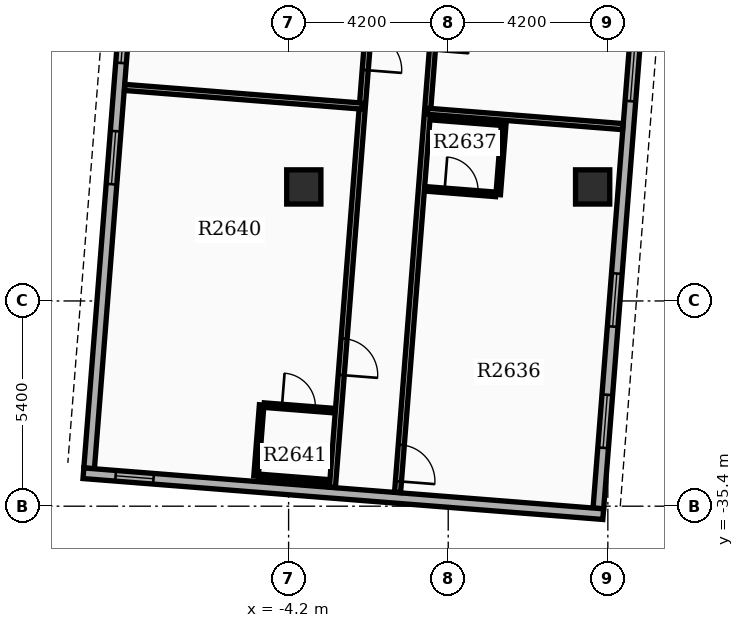
"""IFC4 building model, lengths in metres.
Left out: names, types, materials, properties, quantities, classifications, styles, units other than length and angle.
Written with IfcOpenShell. Run it as: python <this file> out.ifc"""

import sys

from ifc_helpers import new_model, si_unit, direction, frame, frame_2d, origin, origin_2d, place, context, subcontext, project, spatial, rectangle, extrude, element, fill, save


model = new_model("IFC4")
c1 = context("Model", 3, precision=1e-05, world=origin(), true_north=direction((0.0, 1.0)))
c2 = subcontext(c1, "Body", "Model", "MODEL_VIEW")
j1 = project(units=[si_unit("LENGTHUNIT", "METRE"), si_unit("PLANEANGLEUNIT", "RADIAN")], contexts=[c1])
p1 = place(None, origin())
s1 = spatial("IfcSite", under=j1, at=p1, CompositionType="ELEMENT")
p2 = place(p1, origin())
s2 = spatial("IfcBuilding", under=s1, at=p2, CompositionType="ELEMENT")
p3 = place(p2, frame((0.0, 0.0, 164.4)))
s3 = spatial("IfcBuildingStorey", under=s2, at=p3, CompositionType="ELEMENT", Elevation=164.4)
for number, where, z_axis, x_axis in (
    (1, (-3.8, -27.0, 0.0), (0.0, 0.0, 1.0), (1.0, 0.0, 0.0)),
    (2, (3.8, -27.0, 0.0), (0.0, 0.0, 1.0), (1.0, 0.0, 0.0)),
):
    element("IfcColumn", number, at=place(p3, frame(where, z_axis=z_axis, x_axis=x_axis)), inside=s3, PredefinedType="COLUMN", context=c2, shape_type="SweptSolid", body=[
        extrude(rectangle(XDim=0.9, YDim=0.9, at=origin_2d()), origin(), (0.0, 0.0, 1.0), 3.9),
    ])
p4 = place(p3, frame((-7.872, -14.367, 0.0), z_axis=(0.0, 0.0, 1.0), x_axis=(-0.078452802979, -0.996917828963, 0.0)))
e3 = element("IfcWall", 3, at=p4, inside=s3, PredefinedType="STANDARD", context=c2, shape_type="SweptSolid", body=[
    extrude(rectangle(XDim=20.1, YDim=0.28, at=frame_2d((10.05, 0.0))), origin(), (0.0, 0.0, 1.0), 2.97),
])
p5 = place(p4, frame((1.6, 0.0, 0.8)))
e4 = element("IfcOpeningElement", 4, at=p5, cuts=e3, PredefinedType="OPENING", context=c2, shape_type="SweptSolid", body=[
    extrude(rectangle(XDim=1.4, YDim=1.6, at=frame_2d((0.7, 0.8))), frame((0.0, 0.15, 0.0), z_axis=(0.0, -1.0, 0.0), x_axis=(1.0, 0.0, 0.0)), (0.0, 0.0, 1.0), 0.3),
])
p6 = place(p4, frame((4.8, 0.0, 0.8)))
e5 = element("IfcOpeningElement", 5, at=p6, cuts=e3, PredefinedType="OPENING", context=c2, shape_type="SweptSolid", body=[
    extrude(rectangle(XDim=1.4, YDim=1.6, at=frame_2d((0.7, 0.8))), frame((0.0, 0.15, 0.0), z_axis=(0.0, -1.0, 0.0), x_axis=(1.0, 0.0, 0.0)), (0.0, 0.0, 1.0), 0.3),
])
p7 = place(p4, frame((8.0, 0.0, 0.8)))
e6 = element("IfcOpeningElement", 6, at=p7, cuts=e3, PredefinedType="OPENING", context=c2, shape_type="SweptSolid", body=[
    extrude(rectangle(XDim=1.4, YDim=1.6, at=frame_2d((0.7, 0.8))), frame((0.0, 0.15, 0.0), z_axis=(0.0, -1.0, 0.0), x_axis=(1.0, 0.0, 0.0)), (0.0, 0.0, 1.0), 0.3),
])
p8 = place(p4, frame((11.2, 0.0, 0.8)))
e7 = element("IfcOpeningElement", 7, at=p8, cuts=e3, PredefinedType="OPENING", context=c2, shape_type="SweptSolid", body=[
    extrude(rectangle(XDim=1.4, YDim=1.6, at=frame_2d((0.7, 0.8))), frame((0.0, 0.15, 0.0), z_axis=(0.0, -1.0, 0.0), x_axis=(1.0, 0.0, 0.0)), (0.0, 0.0, 1.0), 0.3),
])
p9 = place(p3, frame((3.95, -35.459, 0.0), z_axis=(0.0, 0.0, 1.0), x_axis=(0.078452802979, 0.996917828963, 0.0)))
e8 = element("IfcWall", 8, at=p9, inside=s3, PredefinedType="STANDARD", context=c2, shape_type="SweptSolid", body=[
    extrude(rectangle(XDim=20.1, YDim=0.28, at=frame_2d((10.05, 0.0))), origin(), (0.0, 0.0, 1.0), 2.97),
])
p10 = place(p9, frame((1.6, 0.0, 0.8)))
e9 = element("IfcOpeningElement", 9, at=p10, cuts=e8, PredefinedType="OPENING", context=c2, shape_type="SweptSolid", body=[
    extrude(rectangle(XDim=1.4, YDim=1.6, at=frame_2d((0.7, 0.8))), frame((0.0, 0.15, 0.0), z_axis=(0.0, -1.0, 0.0), x_axis=(1.0, 0.0, 0.0)), (0.0, 0.0, 1.0), 0.3),
])
p11 = place(p9, frame((4.8, 0.0, 0.8)))
e10 = element("IfcOpeningElement", 10, at=p11, cuts=e8, PredefinedType="OPENING", context=c2, shape_type="SweptSolid", body=[
    extrude(rectangle(XDim=1.4, YDim=1.6, at=frame_2d((0.7, 0.8))), frame((0.0, 0.15, 0.0), z_axis=(0.0, -1.0, 0.0), x_axis=(1.0, 0.0, 0.0)), (0.0, 0.0, 1.0), 0.3),
])
p12 = place(p9, frame((10.75, 0.0, 0.8)))
e11 = element("IfcOpeningElement", 11, at=p12, cuts=e8, PredefinedType="OPENING", context=c2, shape_type="SweptSolid", body=[
    extrude(rectangle(XDim=1.4, YDim=1.6, at=frame_2d((0.7, 0.8))), frame((0.0, 0.15, 0.0), z_axis=(0.0, -1.0, 0.0), x_axis=(1.0, 0.0, 0.0)), (0.0, 0.0, 1.0), 0.3),
])
p13 = place(p9, frame((13.95, 0.0, 0.8)))
e12 = element("IfcOpeningElement", 12, at=p13, cuts=e8, PredefinedType="OPENING", context=c2, shape_type="SweptSolid", body=[
    extrude(rectangle(XDim=1.4, YDim=1.6, at=frame_2d((0.7, 0.8))), frame((0.0, 0.15, 0.0), z_axis=(0.0, -1.0, 0.0), x_axis=(1.0, 0.0, 0.0)), (0.0, 0.0, 1.0), 0.3),
])
p14 = place(p3, frame((-9.599, -34.533, 0.0), z_axis=(0.0, 0.0, 1.0), x_axis=(0.996916198482, -0.078473519122, 0.0)))
e13 = element("IfcWall", 13, at=p14, inside=s3, PredefinedType="STANDARD", context=c2, shape_type="SweptSolid", body=[
    extrude(rectangle(XDim=13.72, YDim=0.28, at=frame_2d((6.86, 0.0))), origin(), (0.0, 0.0, 1.0), 2.97),
])
p15 = place(p14, frame((0.85, 0.0, 0.85)))
e14 = element("IfcOpeningElement", 14, at=p15, cuts=e13, PredefinedType="OPENING", context=c2, shape_type="SweptSolid", body=[
    extrude(rectangle(XDim=1.0, YDim=1.5, at=frame_2d((0.5, 0.75))), frame((0.0, 0.15, 0.0), z_axis=(0.0, -1.0, 0.0), x_axis=(1.0, 0.0, 0.0)), (0.0, 0.0, 1.0), 0.3),
])
p16 = place(p3, frame((0.25, -14.916, 0.0), z_axis=(0.0, 0.0, 1.0), x_axis=(-0.078460461943, -0.996917226209, 0.0)))
e15 = element("IfcWall", 15, at=p16, inside=s3, PredefinedType="PARTITIONING", context=c2, shape_type="SweptSolid", body=[
    extrude(rectangle(XDim=20.182, YDim=0.16, at=frame_2d((10.091, 0.0))), origin(), (0.0, 0.0, 1.0), 2.96),
])
p17 = place(p16, frame((7.559, 0.0, 0.0)))
e16 = element("IfcOpeningElement", 16, at=p17, cuts=e15, PredefinedType="OPENING", context=c2, shape_type="SweptSolid", body=[
    extrude(rectangle(XDim=0.96, YDim=2.15, at=frame_2d((0.48, 1.075))), frame((0.0, 0.09, 0.0), z_axis=(0.0, -1.0, 0.0), x_axis=(1.0, 0.0, 0.0)), (0.0, 0.0, 1.0), 0.18),
])
p18 = place(p16, frame((18.93, 0.0, 0.0)))
e17 = element("IfcOpeningElement", 17, at=p18, cuts=e15, PredefinedType="OPENING", context=c2, shape_type="SweptSolid", body=[
    extrude(rectangle(XDim=0.96, YDim=2.15, at=frame_2d((0.48, 1.075))), frame((0.0, 0.09, 0.0), z_axis=(0.0, -1.0, 0.0), x_axis=(1.0, 0.0, 0.0)), (0.0, 0.0, 1.0), 0.18),
])
p19 = place(p3, frame((-0.544, -25.008, 0.0), z_axis=(0.0, 0.0, 1.0), x_axis=(0.99691602815, -0.078475682969, 0.0)))
e18 = element("IfcWall", 18, at=p19, inside=s3, PredefinedType="PARTITIONING", context=c2, shape_type="SweptSolid", body=[
    extrude(rectangle(XDim=5.152, YDim=0.16, at=frame_2d((2.576, 0.0))), origin(), (0.0, 0.0, 1.0), 2.96),
])
p20 = place(p3, frame((-0.564, -27.053, 0.0), z_axis=(0.0, 0.0, 1.0), x_axis=(0.996915574626, -0.078481444107, 0.0)))
e19 = element("IfcWall", 19, at=p20, inside=s3, PredefinedType="PARTITIONING", context=c2, shape_type="SweptSolid", body=[
    extrude(rectangle(XDim=1.82, YDim=0.12, at=frame_2d((0.91, 0.0))), origin(), (0.0, 0.0, 1.0), 2.96),
])
p21 = place(p20, frame((0.47, 0.0, 0.0)))
e20 = element("IfcOpeningElement", 20, at=p21, cuts=e19, PredefinedType="OPENING", context=c2, shape_type="SweptSolid", body=[
    extrude(rectangle(XDim=0.88, YDim=2.1, at=frame_2d((0.44, 1.05))), frame((0.0, 0.07, 0.0), z_axis=(0.0, -1.0, 0.0), x_axis=(1.0, 0.0, 0.0)), (0.0, 0.0, 1.0), 0.14),
])
p22 = place(p3, frame((-0.417, -25.179, 0.0), z_axis=(0.0, 0.0, 1.0), x_axis=(0.996916400774, -0.0784709492, 0.0)))
e21 = element("IfcWall", 21, at=p22, inside=s3, PredefinedType="PARTITIONING", context=c2, shape_type="SweptSolid", body=[
    extrude(rectangle(XDim=1.82, YDim=0.12, at=frame_2d((0.91, 0.0))), origin(), (0.0, 0.0, 1.0), 2.96),
])
p23 = place(p3, frame((1.462, -25.327, 0.0), z_axis=(0.0, 0.0, 1.0), x_axis=(-0.078444342213, -0.99691849475, 0.0)))
e22 = element("IfcWall", 22, at=p23, inside=s3, PredefinedType="PARTITIONING", context=c2, shape_type="SweptSolid", body=[
    extrude(rectangle(XDim=1.88, YDim=0.12, at=frame_2d((0.94, 0.0))), origin(), (0.0, 0.0, 1.0), 2.96),
])
p24 = place(p3, frame((-1.464, -14.781, 0.0), z_axis=(0.0, 0.0, 1.0), x_axis=(-0.078461408156, -0.996917151738, 0.0)))
e23 = element("IfcWall", 23, at=p24, inside=s3, PredefinedType="PARTITIONING", context=c2, shape_type="SweptSolid", body=[
    extrude(rectangle(XDim=20.182, YDim=0.16, at=frame_2d((10.091, 0.0))), origin(), (0.0, 0.0, 1.0), 2.96),
])
p25 = place(p24, frame((8.212, 0.0, 0.0)))
e24 = element("IfcOpeningElement", 24, at=p25, cuts=e23, PredefinedType="OPENING", context=c2, shape_type="SweptSolid", body=[
    extrude(rectangle(XDim=0.96, YDim=2.15, at=frame_2d((0.48, 1.075))), frame((0.0, 0.09, 0.0), z_axis=(0.0, -1.0, 0.0), x_axis=(1.0, 0.0, 0.0)), (0.0, 0.0, 1.0), 0.18),
])
p26 = place(p24, frame((16.261, 0.0, 0.0)))
e25 = element("IfcOpeningElement", 25, at=p26, cuts=e23, PredefinedType="OPENING", context=c2, shape_type="SweptSolid", body=[
    extrude(rectangle(XDim=0.96, YDim=2.15, at=frame_2d((0.48, 1.075))), frame((0.0, 0.09, 0.0), z_axis=(0.0, -1.0, 0.0), x_axis=(1.0, 0.0, 0.0)), (0.0, 0.0, 1.0), 0.18),
])
p27 = place(p3, frame((-2.259, -24.874, 0.0), z_axis=(0.0, 0.0, 1.0), x_axis=(-0.996916205331, 0.078473432117, 0.0)))
e26 = element("IfcWall", 26, at=p27, inside=s3, PredefinedType="PARTITIONING", context=c2, shape_type="SweptSolid", body=[
    extrude(rectangle(XDim=6.272, YDim=0.16, at=frame_2d((3.136, 0.0))), origin(), (0.0, 0.0, 1.0), 2.96),
])
p28 = place(p3, frame((-4.844, -32.741, 0.0), z_axis=(0.0, 0.0, 1.0), x_axis=(0.996916400774, -0.0784709492, 0.0)))
e27 = element("IfcWall", 27, at=p28, inside=s3, PredefinedType="PARTITIONING", context=c2, shape_type="SweptSolid", body=[
    extrude(rectangle(XDim=1.82, YDim=0.12, at=frame_2d((0.91, 0.0))), origin(), (0.0, 0.0, 1.0), 2.96),
])
p29 = place(p28, frame((0.47, 0.0, 0.0)))
e28 = element("IfcOpeningElement", 28, at=p29, cuts=e27, PredefinedType="OPENING", context=c2, shape_type="SweptSolid", body=[
    extrude(rectangle(XDim=0.88, YDim=2.1, at=frame_2d((0.44, 1.05))), frame((0.0, 0.07, 0.0), z_axis=(0.0, -1.0, 0.0), x_axis=(1.0, 0.0, 0.0)), (0.0, 0.0, 1.0), 0.14),
])
p30 = place(p3, frame((-4.991, -34.615, 0.0), z_axis=(0.0, 0.0, 1.0), x_axis=(0.996915574626, -0.078481444107, 0.0)))
e29 = element("IfcWall", 29, at=p30, inside=s3, PredefinedType="PARTITIONING", context=c2, shape_type="SweptSolid", body=[
    extrude(rectangle(XDim=1.82, YDim=0.12, at=frame_2d((0.91, 0.0))), origin(), (0.0, 0.0, 1.0), 2.96),
])
p31 = place(p3, frame((-4.909, -32.736, 0.0), z_axis=(0.0, 0.0, 1.0), x_axis=(-0.07843418698, -0.996919293781, 0.0)))
e30 = element("IfcWall", 30, at=p31, inside=s3, PredefinedType="PARTITIONING", context=c2, shape_type="SweptSolid", body=[
    extrude(rectangle(XDim=1.88, YDim=0.12, at=frame_2d((0.94, 0.0))), origin(), (0.0, 0.0, 1.0), 2.96),
])
p32 = place(p7, origin())
e31 = element("IfcWindow", 31, at=p32, inside=s3, PartitioningType="SINGLE_PANEL", PredefinedType="WINDOW", context=c2, shape_type="SweptSolid", body=[
    extrude(rectangle(XDim=1.4, YDim=1.6, at=frame_2d((0.7, 0.8))), frame((0.0, 0.03, 0.0), z_axis=(0.0, -1.0, 0.0), x_axis=(1.0, 0.0, 0.0)), (0.0, 0.0, 1.0), 0.06),
])
fill(e6, e31)
p33 = place(p8, origin())
e32 = element("IfcWindow", 32, at=p33, inside=s3, PartitioningType="SINGLE_PANEL", PredefinedType="WINDOW", context=c2, shape_type="SweptSolid", body=[
    extrude(rectangle(XDim=1.4, YDim=1.6, at=frame_2d((0.7, 0.8))), frame((0.0, 0.03, 0.0), z_axis=(0.0, -1.0, 0.0), x_axis=(1.0, 0.0, 0.0)), (0.0, 0.0, 1.0), 0.06),
])
fill(e7, e32)
p34 = place(p10, origin())
e33 = element("IfcWindow", 33, at=p34, inside=s3, PartitioningType="SINGLE_PANEL", PredefinedType="WINDOW", context=c2, shape_type="SweptSolid", body=[
    extrude(rectangle(XDim=1.4, YDim=1.6, at=frame_2d((0.7, 0.8))), frame((0.0, 0.03, 0.0), z_axis=(0.0, -1.0, 0.0), x_axis=(1.0, 0.0, 0.0)), (0.0, 0.0, 1.0), 0.06),
])
fill(e9, e33)
p35 = place(p11, origin())
e34 = element("IfcWindow", 34, at=p35, inside=s3, PartitioningType="SINGLE_PANEL", PredefinedType="WINDOW", context=c2, shape_type="SweptSolid", body=[
    extrude(rectangle(XDim=1.4, YDim=1.6, at=frame_2d((0.7, 0.8))), frame((0.0, 0.03, 0.0), z_axis=(0.0, -1.0, 0.0), x_axis=(1.0, 0.0, 0.0)), (0.0, 0.0, 1.0), 0.06),
])
fill(e10, e34)
p36 = place(p12, origin())
e35 = element("IfcWindow", 35, at=p36, inside=s3, PartitioningType="SINGLE_PANEL", PredefinedType="WINDOW", context=c2, shape_type="SweptSolid", body=[
    extrude(rectangle(XDim=1.4, YDim=1.6, at=frame_2d((0.7, 0.8))), frame((0.0, 0.03, 0.0), z_axis=(0.0, -1.0, 0.0), x_axis=(1.0, 0.0, 0.0)), (0.0, 0.0, 1.0), 0.06),
])
fill(e11, e35)
p37 = place(p15, origin())
e36 = element("IfcWindow", 36, at=p37, inside=s3, PartitioningType="SINGLE_PANEL", PredefinedType="WINDOW", context=c2, shape_type="SweptSolid", body=[
    extrude(rectangle(XDim=1.0, YDim=1.5, at=frame_2d((0.5, 0.75))), frame((0.0, 0.03, 0.0), z_axis=(0.0, -1.0, 0.0), x_axis=(1.0, 0.0, 0.0)), (0.0, 0.0, 1.0), 0.06),
])
fill(e14, e36)
p38 = place(p18, origin())
e37 = element("IfcDoor", 37, at=p38, inside=s3, OperationType="SINGLE_SWING_RIGHT", PredefinedType="DOOR", context=c2, shape_type="SweptSolid", body=[
    extrude(rectangle(XDim=0.96, YDim=2.15, at=frame_2d((0.48, 1.075))), frame((0.0, 0.025, 0.0), z_axis=(0.0, -1.0, 0.0), x_axis=(1.0, 0.0, 0.0)), (0.0, 0.0, 1.0), 0.05),
])
fill(e17, e37)
p39 = place(p21, origin())
e38 = element("IfcDoor", 38, at=p39, inside=s3, OperationType="SINGLE_SWING_LEFT", PredefinedType="DOOR", context=c2, shape_type="SweptSolid", body=[
    extrude(rectangle(XDim=0.88, YDim=2.1, at=frame_2d((0.44, 1.05))), frame((0.0, 0.025, 0.0), z_axis=(0.0, -1.0, 0.0), x_axis=(1.0, 0.0, 0.0)), (0.0, 0.0, 1.0), 0.05),
])
fill(e20, e38)
p40 = place(p25, origin())
e39 = element("IfcDoor", 39, at=p40, inside=s3, OperationType="SINGLE_SWING_RIGHT", PredefinedType="DOOR", context=c2, shape_type="SweptSolid", body=[
    extrude(rectangle(XDim=0.96, YDim=2.15, at=frame_2d((0.48, 1.075))), frame((0.0, 0.025, 0.0), z_axis=(0.0, -1.0, 0.0), x_axis=(1.0, 0.0, 0.0)), (0.0, 0.0, 1.0), 0.05),
])
fill(e24, e39)
p41 = place(p26, origin())
e40 = element("IfcDoor", 40, at=p41, inside=s3, OperationType="SINGLE_SWING_RIGHT", PredefinedType="DOOR", context=c2, shape_type="SweptSolid", body=[
    extrude(rectangle(XDim=0.96, YDim=2.15, at=frame_2d((0.48, 1.075))), frame((0.0, 0.025, 0.0), z_axis=(0.0, -1.0, 0.0), x_axis=(1.0, 0.0, 0.0)), (0.0, 0.0, 1.0), 0.05),
])
fill(e25, e40)
p42 = place(p29, origin())
e41 = element("IfcDoor", 41, at=p42, inside=s3, OperationType="SINGLE_SWING_LEFT", PredefinedType="DOOR", context=c2, shape_type="SweptSolid", body=[
    extrude(rectangle(XDim=0.88, YDim=2.1, at=frame_2d((0.44, 1.05))), frame((0.0, 0.025, 0.0), z_axis=(0.0, -1.0, 0.0), x_axis=(1.0, 0.0, 0.0)), (0.0, 0.0, 1.0), 0.05),
])
fill(e28, e41)
save(model, sys.argv[1])
